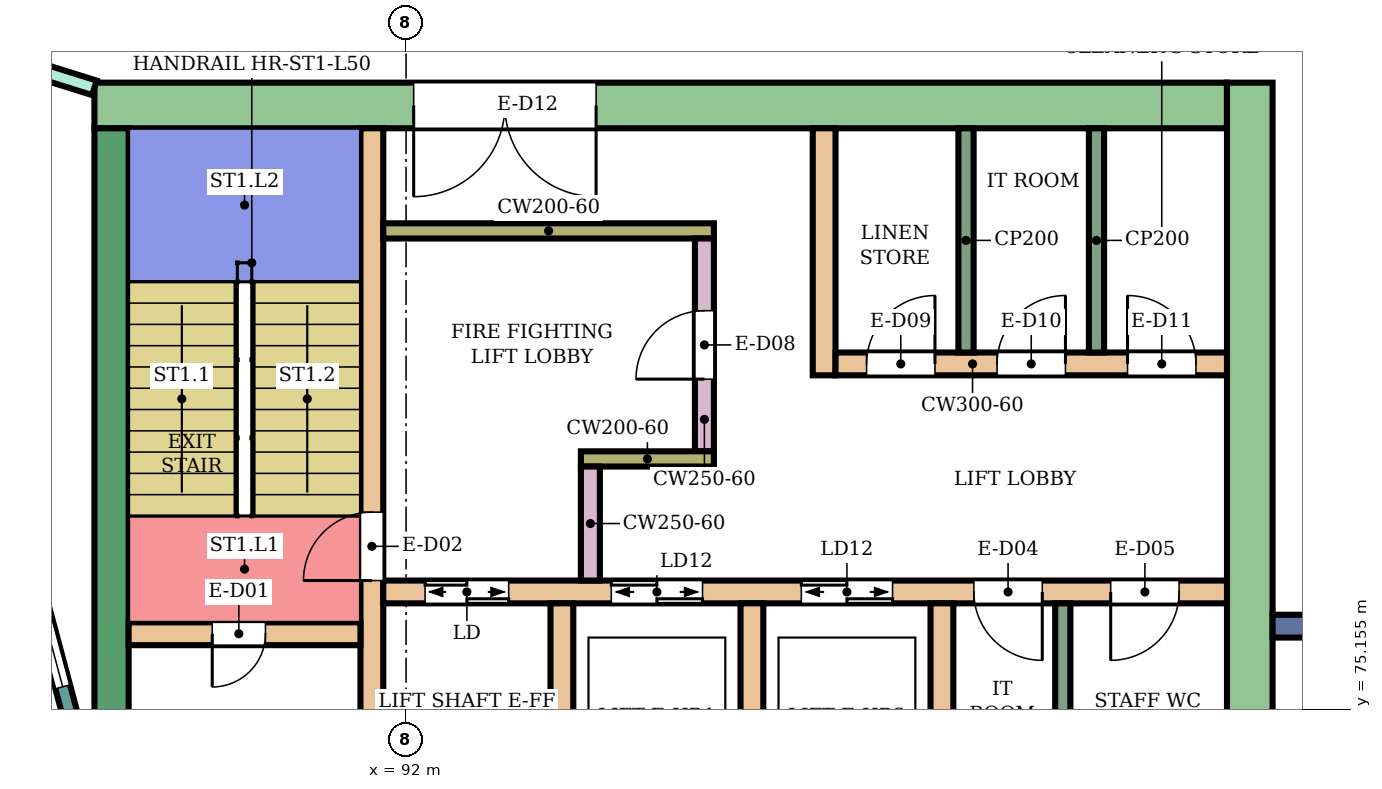
"""IFC4 building model, lengths in metres.
Left out: names, types, materials, properties, quantities, classifications, styles, units other than length and angle.
Written with IfcOpenShell. Run it as: python <this file> out.ifc"""

import sys

from ifc_helpers import new_model, si_unit, direction, frame, frame_2d, origin, place, context, subcontext, project, spatial, rectangle, extrude, element, fill, save


model = new_model("IFC4")
c1 = context("Model", 3, precision=1e-05, world=origin(), true_north=direction((0.0, 1.0)))
c2 = subcontext(c1, "Body", "Model", "MODEL_VIEW")
j1 = project(units=[si_unit("LENGTHUNIT", "METRE"), si_unit("PLANEANGLEUNIT", "RADIAN")], contexts=[c1])
p1 = place(None, origin())
s1 = spatial("IfcSite", under=j1, at=p1, CompositionType="ELEMENT")
p2 = place(p1, origin())
s2 = spatial("IfcBuilding", under=s1, at=p2, CompositionType="ELEMENT")
p3 = place(p2, frame((0.0, 0.0, 216.7)))
s3 = spatial("IfcBuildingStorey", under=s2, at=p3, CompositionType="ELEMENT", Elevation=216.7)
p4 = place(p3, frame((87.9, 83.1, 0.0), z_axis=(0.0, 0.0, 1.0), x_axis=(1.0, 0.0, 0.0)))
e1 = element("IfcWall", 1, at=p4, inside=s3, PredefinedType="SHEAR", context=c2, shape_type="SweptSolid", body=[
    extrude(rectangle(XDim=14.9, YDim=0.6, at=frame_2d((7.45, 0.0))), origin(), (0.0, 0.0, 1.0), 3.88),
])
p5 = place(p4, frame((4.2, 0.0, 0.0)))
e2 = element("IfcOpeningElement", 2, at=p5, cuts=e1, PredefinedType="OPENING", context=c2, shape_type="SweptSolid", body=[
    extrude(rectangle(XDim=2.4, YDim=2.4, at=frame_2d((1.2, 1.2))), frame((0.0, 0.31, 0.0), z_axis=(0.0, -1.0, 0.0), x_axis=(1.0, 0.0, 0.0)), (0.0, 0.0, 1.0), 0.62),
])
p6 = place(p3, frame((88.125, 75.0, 0.0), z_axis=(0.0, 0.0, 1.0), x_axis=(0.0, 1.0, 0.0)))
e3 = element("IfcWall", 3, at=p6, inside=s3, PredefinedType="SHEAR", context=c2, shape_type="SweptSolid", body=[
    extrude(rectangle(XDim=7.8, YDim=0.45, at=frame_2d((3.9, 0.0))), origin(), (0.0, 0.0, 1.0), 3.88),
])
p7 = place(p3, frame((103.1, 66.6, 0.0), z_axis=(0.0, 0.0, 1.0), x_axis=(0.0, 1.0, 0.0)))
e4 = element("IfcWall", 4, at=p7, inside=s3, PredefinedType="SHEAR", context=c2, shape_type="SweptSolid", body=[
    extrude(rectangle(XDim=16.8, YDim=0.6, at=frame_2d((8.4, 0.0))), origin(), (0.0, 0.0, 1.0), 3.88),
])
p8 = place(p3, frame((91.55, 75.0, 0.0), z_axis=(0.0, 0.0, 1.0), x_axis=(0.0, 1.0, 0.0)))
e5 = element("IfcWall", 5, at=p8, inside=s3, PredefinedType="SHEAR", context=c2, shape_type="SweptSolid", body=[
    extrude(rectangle(XDim=7.8, YDim=0.3, at=frame_2d((3.9, 0.0))), origin(), (0.0, 0.0, 1.0), 3.88),
])
p9 = place(p8, frame((1.85, 0.0, 0.0)))
e6 = element("IfcOpeningElement", 6, at=p9, cuts=e5, PredefinedType="OPENING", context=c2, shape_type="SweptSolid", body=[
    extrude(rectangle(XDim=0.9, YDim=2.1, at=frame_2d((0.45, 1.05))), frame((0.0, 0.16, 0.0), z_axis=(0.0, -1.0, 0.0), x_axis=(1.0, 0.0, 0.0)), (0.0, 0.0, 1.0), 0.32),
])
p10 = place(p3, frame((88.35, 76.15, 0.0), z_axis=(0.0, 0.0, 1.0), x_axis=(1.0, 0.0, 0.0)))
e7 = element("IfcWall", 7, at=p10, inside=s3, PredefinedType="SHEAR", context=c2, shape_type="SweptSolid", body=[
    extrude(rectangle(XDim=3.05, YDim=0.3, at=frame_2d((1.525, 0.0))), origin(), (0.0, 0.0, 1.0), 3.88),
])
p11 = place(p10, frame((1.1, 0.0, 0.0)))
e8 = element("IfcOpeningElement", 8, at=p11, cuts=e7, PredefinedType="OPENING", context=c2, shape_type="SweptSolid", body=[
    extrude(rectangle(XDim=0.7, YDim=2.0, at=frame_2d((0.35, 1.0))), frame((0.0, 0.16, 0.0), z_axis=(0.0, -1.0, 0.0), x_axis=(1.0, 0.0, 0.0)), (0.0, 0.0, 1.0), 0.32),
])
p12 = place(p3, frame((91.7, 76.7, 0.0), z_axis=(0.0, 0.0, 1.0), x_axis=(1.0, 0.0, 0.0)))
e9 = element("IfcWall", 9, at=p12, inside=s3, PredefinedType="SHEAR", context=c2, shape_type="SweptSolid", body=[
    extrude(rectangle(XDim=11.1, YDim=0.3, at=frame_2d((5.55, 0.0))), origin(), (0.0, 0.0, 1.0), 3.88),
])
p13 = place(p12, frame((0.55, 0.0, 0.0)))
e10 = element("IfcOpeningElement", 10, at=p13, cuts=e9, PredefinedType="OPENING", context=c2, shape_type="SweptSolid", body=[
    extrude(rectangle(XDim=1.1, YDim=2.1, at=frame_2d((0.55, 1.05))), frame((0.0, 0.16, 0.0), z_axis=(0.0, -1.0, 0.0), x_axis=(1.0, 0.0, 0.0)), (0.0, 0.0, 1.0), 0.32),
])
p14 = place(p12, frame((3.0, 0.0, 0.0)))
e11 = element("IfcOpeningElement", 11, at=p14, cuts=e9, PredefinedType="OPENING", context=c2, shape_type="SweptSolid", body=[
    extrude(rectangle(XDim=1.2, YDim=2.1, at=frame_2d((0.6, 1.05))), frame((0.0, 0.16, 0.0), z_axis=(0.0, -1.0, 0.0), x_axis=(1.0, 0.0, 0.0)), (0.0, 0.0, 1.0), 0.32),
])
p15 = place(p12, frame((5.5, 0.0, 0.0)))
e12 = element("IfcOpeningElement", 12, at=p15, cuts=e9, PredefinedType="OPENING", context=c2, shape_type="SweptSolid", body=[
    extrude(rectangle(XDim=1.2, YDim=2.1, at=frame_2d((0.6, 1.05))), frame((0.0, 0.16, 0.0), z_axis=(0.0, -1.0, 0.0), x_axis=(1.0, 0.0, 0.0)), (0.0, 0.0, 1.0), 0.32),
])
p16 = place(p12, frame((7.77, 0.0, 0.0)))
e13 = element("IfcOpeningElement", 13, at=p16, cuts=e9, PredefinedType="OPENING", context=c2, shape_type="SweptSolid", body=[
    extrude(rectangle(XDim=0.9, YDim=2.1, at=frame_2d((0.45, 1.05))), frame((0.0, 0.16, 0.0), z_axis=(0.0, -1.0, 0.0), x_axis=(1.0, 0.0, 0.0)), (0.0, 0.0, 1.0), 0.32),
])
p17 = place(p12, frame((9.57, 0.0, 0.0)))
e14 = element("IfcOpeningElement", 14, at=p17, cuts=e9, PredefinedType="OPENING", context=c2, shape_type="SweptSolid", body=[
    extrude(rectangle(XDim=0.9, YDim=2.1, at=frame_2d((0.45, 1.05))), frame((0.0, 0.16, 0.0), z_axis=(0.0, -1.0, 0.0), x_axis=(1.0, 0.0, 0.0)), (0.0, 0.0, 1.0), 0.32),
])
for number, where, z_axis, x_axis in (
    (15, (94.05, 74.0, 0.0), (0.0, 0.0, 1.0), (0.0, 1.0, 0.0)),
    (16, (96.55, 74.0, 0.0), (0.0, 0.0, 1.0), (0.0, 1.0, 0.0)),
    (17, (99.05, 74.0, 0.0), (0.0, 0.0, 1.0), (0.0, 1.0, 0.0)),
):
    element("IfcWall", number, at=place(p3, frame(where, z_axis=z_axis, x_axis=x_axis)), inside=s3, PredefinedType="SHEAR", context=c2, shape_type="SweptSolid", body=[
        extrude(rectangle(XDim=2.55, YDim=0.3, at=frame_2d((1.275, 0.0))), origin(), (0.0, 0.0, 1.0), 3.88),
    ])
p18 = place(p3, frame((91.7, 81.45, 0.0), z_axis=(0.0, 0.0, 1.0), x_axis=(1.0, 0.0, 0.0)))
e18 = element("IfcWall", 18, at=p18, inside=s3, PredefinedType="SHEAR", context=c2, shape_type="SweptSolid", body=[
    extrude(rectangle(XDim=4.35, YDim=0.2, at=frame_2d((2.175, 0.0))), origin(), (0.0, 0.0, 1.0), 3.88),
])
p19 = place(p3, frame((95.925, 78.55, 0.0), z_axis=(0.0, 0.0, 1.0), x_axis=(0.0, 1.0, 0.0)))
e19 = element("IfcWall", 19, at=p19, inside=s3, PredefinedType="SHEAR", context=c2, shape_type="SweptSolid", body=[
    extrude(rectangle(XDim=2.8, YDim=0.25, at=frame_2d((1.4, 0.0))), origin(), (0.0, 0.0, 1.0), 3.88),
])
p20 = place(p19, frame((0.95, 0.0, 0.0)))
e20 = element("IfcOpeningElement", 20, at=p20, cuts=e19, PredefinedType="OPENING", context=c2, shape_type="SweptSolid", body=[
    extrude(rectangle(XDim=0.9, YDim=2.1, at=frame_2d((0.45, 1.05))), frame((0.0, 0.135, 0.0), z_axis=(0.0, -1.0, 0.0), x_axis=(1.0, 0.0, 0.0)), (0.0, 0.0, 1.0), 0.27),
])
p21 = place(p3, frame((94.3, 78.45, 0.0), z_axis=(0.0, 0.0, 1.0), x_axis=(1.0, 0.0, 0.0)))
e21 = element("IfcWall", 21, at=p21, inside=s3, PredefinedType="SHEAR", context=c2, shape_type="SweptSolid", body=[
    extrude(rectangle(XDim=1.75, YDim=0.2, at=frame_2d((0.875, 0.0))), origin(), (0.0, 0.0, 1.0), 3.88),
])
p22 = place(p3, frame((94.425, 76.85, 0.0), z_axis=(0.0, 0.0, 1.0), x_axis=(0.0, 1.0, 0.0)))
e22 = element("IfcWall", 22, at=p22, inside=s3, PredefinedType="SHEAR", context=c2, shape_type="SweptSolid", body=[
    extrude(rectangle(XDim=1.5, YDim=0.25, at=frame_2d((0.75, 0.0))), origin(), (0.0, 0.0, 1.0), 3.88),
])
p23 = place(p3, frame((97.5, 79.55, 0.0), z_axis=(0.0, 0.0, 1.0), x_axis=(0.0, 1.0, 0.0)))
e23 = element("IfcWall", 23, at=p23, inside=s3, PredefinedType="SHEAR", context=c2, shape_type="SweptSolid", body=[
    extrude(rectangle(XDim=3.25, YDim=0.3, at=frame_2d((1.625, 0.0))), origin(), (0.0, 0.0, 1.0), 3.88),
])
p24 = place(p3, frame((97.65, 79.7, 0.0), z_axis=(0.0, 0.0, 1.0), x_axis=(1.0, 0.0, 0.0)))
e24 = element("IfcWall", 24, at=p24, inside=s3, PredefinedType="SHEAR", context=c2, shape_type="SweptSolid", body=[
    extrude(rectangle(XDim=5.15, YDim=0.3, at=frame_2d((2.575, 0.0))), origin(), (0.0, 0.0, 1.0), 3.88),
])
p25 = place(p24, frame((0.408, 0.0, 0.0)))
e25 = element("IfcOpeningElement", 25, at=p25, cuts=e24, PredefinedType="OPENING", context=c2, shape_type="SweptSolid", body=[
    extrude(rectangle(XDim=0.9, YDim=2.1, at=frame_2d((0.45, 1.05))), frame((0.0, 0.16, 0.0), z_axis=(0.0, -1.0, 0.0), x_axis=(1.0, 0.0, 0.0)), (0.0, 0.0, 1.0), 0.32),
])
p26 = place(p24, frame((2.125, 0.0, 0.0)))
e26 = element("IfcOpeningElement", 26, at=p26, cuts=e24, PredefinedType="OPENING", context=c2, shape_type="SweptSolid", body=[
    extrude(rectangle(XDim=0.9, YDim=2.1, at=frame_2d((0.45, 1.05))), frame((0.0, 0.16, 0.0), z_axis=(0.0, -1.0, 0.0), x_axis=(1.0, 0.0, 0.0)), (0.0, 0.0, 1.0), 0.32),
])
p27 = place(p24, frame((3.842, 0.0, 0.0)))
e27 = element("IfcOpeningElement", 27, at=p27, cuts=e24, PredefinedType="OPENING", context=c2, shape_type="SweptSolid", body=[
    extrude(rectangle(XDim=0.9, YDim=2.1, at=frame_2d((0.45, 1.05))), frame((0.0, 0.16, 0.0), z_axis=(0.0, -1.0, 0.0), x_axis=(1.0, 0.0, 0.0)), (0.0, 0.0, 1.0), 0.32),
])
p28 = place(p3, frame((103.4, 76.25, 0.0), z_axis=(0.0, 0.0, 1.0), x_axis=(1.0, 0.0, 0.0)))
e28 = element("IfcWall", 28, at=p28, inside=s3, PredefinedType="NOTDEFINED", context=c2, shape_type="SweptSolid", body=[
    extrude(rectangle(XDim=2.416, YDim=0.3, at=frame_2d((1.208, 0.0))), origin(), (0.0, 0.0, 1.0), 4.2),
])
p29 = place(p3, frame((87.604, 75.0, 0.0), z_axis=(0.0, 0.0, 1.0), x_axis=(-0.258789828301, 0.965933654434, 0.0)))
e29 = element("IfcWall", 29, at=p29, inside=s3, PredefinedType="NOTDEFINED", context=c2, shape_type="SweptSolid", body=[
    extrude(rectangle(XDim=3.936, YDim=0.2, at=frame_2d((1.968, 0.0))), origin(), (0.0, 0.0, 1.0), 4.2),
])
p30 = place(p29, frame((0.468, 0.0, 0.9)))
e30 = element("IfcOpeningElement", 30, at=p30, cuts=e29, PredefinedType="OPENING", context=c2, shape_type="SweptSolid", body=[
    extrude(rectangle(XDim=3.0, YDim=2.3, at=frame_2d((1.5, 1.15))), frame((0.0, 0.11, 0.0), z_axis=(0.0, -1.0, 0.0), x_axis=(1.0, 0.0, 0.0)), (0.0, 0.0, 1.0), 0.22),
])
p31 = place(p3, frame((85.587, 84.057, 0.0), z_axis=(0.0, 0.0, 1.0), x_axis=(0.954239513179, -0.299043393987, 0.0)))
e31 = element("IfcWall", 31, at=p31, inside=s3, PredefinedType="PARTITIONING", context=c2, shape_type="SweptSolid", body=[
    extrude(rectangle(XDim=2.424, YDim=0.2, at=frame_2d((1.212, 0.0))), origin(), (0.0, 0.0, 1.0), 3.75),
])
p32 = place(p31, frame((0.762, 0.0, 0.0)))
e32 = element("IfcOpeningElement", 32, at=p32, cuts=e31, PredefinedType="OPENING", context=c2, shape_type="SweptSolid", body=[
    extrude(rectangle(XDim=0.9, YDim=2.1, at=frame_2d((0.45, 1.05))), frame((0.0, 0.11, 0.0), z_axis=(0.0, -1.0, 0.0), x_axis=(1.0, 0.0, 0.0)), (0.0, 0.0, 1.0), 0.22),
])
p33 = place(p3, frame((100.64, 74.0, 0.0), z_axis=(0.0, 0.0, 1.0), x_axis=(0.0, 1.0, 0.0)))
e33 = element("IfcWall", 33, at=p33, inside=s3, PredefinedType="PARTITIONING", context=c2, shape_type="SweptSolid", body=[
    extrude(rectangle(XDim=2.55, YDim=0.2, at=frame_2d((1.275, 0.0))), origin(), (0.0, 0.0, 1.0), 3.88),
])
for number, where, z_axis, x_axis in (
    (34, (99.367, 79.85, 0.0), (0.0, 0.0, 1.0), (0.0, 1.0, 0.0)),
    (35, (101.083, 79.85, 0.0), (0.0, 0.0, 1.0), (0.0, 1.0, 0.0)),
):
    element("IfcWall", number, at=place(p3, frame(where, z_axis=z_axis, x_axis=x_axis)), inside=s3, PredefinedType="PARTITIONING", context=c2, shape_type="SweptSolid", body=[
        extrude(rectangle(XDim=2.95, YDim=0.2, at=frame_2d((1.475, 0.0))), origin(), (0.0, 0.0, 1.0), 3.88),
    ])
p34 = place(p30, origin())
e36 = element("IfcWindow", 36, at=p34, inside=s3, PartitioningType="SINGLE_PANEL", PredefinedType="WINDOW", context=c2, shape_type="SweptSolid", body=[
    extrude(rectangle(XDim=3.0, YDim=2.3, at=frame_2d((1.5, 1.15))), frame((0.0, 0.03, 0.0), z_axis=(0.0, -1.0, 0.0), x_axis=(1.0, 0.0, 0.0)), (0.0, 0.0, 1.0), 0.06),
])
fill(e30, e36)
p35 = place(p11, frame((0.7, 0.0, 0.0), z_axis=(0.0, 0.0, 1.0), x_axis=(-1.0, 0.0, 0.0)))
e37 = element("IfcDoor", 37, at=p35, inside=s3, OperationType="SINGLE_SWING_RIGHT", PredefinedType="DOOR", context=c2, shape_type="SweptSolid", body=[
    extrude(rectangle(XDim=0.7, YDim=2.0, at=frame_2d((0.35, 1.0))), frame((0.0, 0.025, 0.0), z_axis=(0.0, -1.0, 0.0), x_axis=(1.0, 0.0, 0.0)), (0.0, 0.0, 1.0), 0.05),
])
fill(e8, e37)
p36 = place(p9, origin())
e38 = element("IfcDoor", 38, at=p36, inside=s3, OperationType="SINGLE_SWING_LEFT", PredefinedType="DOOR", context=c2, shape_type="SweptSolid", body=[
    extrude(rectangle(XDim=0.9, YDim=2.1, at=frame_2d((0.45, 1.05))), frame((0.0, 0.025, 0.0), z_axis=(0.0, -1.0, 0.0), x_axis=(1.0, 0.0, 0.0)), (0.0, 0.0, 1.0), 0.05),
])
fill(e6, e38)
p37 = place(p13, origin())
e39 = element("IfcDoor", 39, at=p37, inside=s3, OperationType="DOUBLE_DOOR_SLIDING", PredefinedType="DOOR", context=c2, shape_type="SweptSolid", body=[
    extrude(rectangle(XDim=1.1, YDim=2.1, at=frame_2d((0.55, 1.05))), frame((0.0, 0.025, 0.0), z_axis=(0.0, -1.0, 0.0), x_axis=(1.0, 0.0, 0.0)), (0.0, 0.0, 1.0), 0.05),
])
fill(e10, e39)
p38 = place(p14, origin())
e40 = element("IfcDoor", 40, at=p38, inside=s3, OperationType="DOUBLE_DOOR_SLIDING", PredefinedType="DOOR", context=c2, shape_type="SweptSolid", body=[
    extrude(rectangle(XDim=1.2, YDim=2.1, at=frame_2d((0.6, 1.05))), frame((0.0, 0.025, 0.0), z_axis=(0.0, -1.0, 0.0), x_axis=(1.0, 0.0, 0.0)), (0.0, 0.0, 1.0), 0.05),
])
fill(e11, e40)
p39 = place(p15, origin())
e41 = element("IfcDoor", 41, at=p39, inside=s3, OperationType="DOUBLE_DOOR_SLIDING", PredefinedType="DOOR", context=c2, shape_type="SweptSolid", body=[
    extrude(rectangle(XDim=1.2, YDim=2.1, at=frame_2d((0.6, 1.05))), frame((0.0, 0.025, 0.0), z_axis=(0.0, -1.0, 0.0), x_axis=(1.0, 0.0, 0.0)), (0.0, 0.0, 1.0), 0.05),
])
fill(e12, e41)
p40 = place(p16, frame((0.9, 0.0, 0.0), z_axis=(0.0, 0.0, 1.0), x_axis=(-1.0, 0.0, 0.0)))
e42 = element("IfcDoor", 42, at=p40, inside=s3, OperationType="SINGLE_SWING_LEFT", PredefinedType="DOOR", context=c2, shape_type="SweptSolid", body=[
    extrude(rectangle(XDim=0.9, YDim=2.1, at=frame_2d((0.45, 1.05))), frame((0.0, 0.025, 0.0), z_axis=(0.0, -1.0, 0.0), x_axis=(1.0, 0.0, 0.0)), (0.0, 0.0, 1.0), 0.05),
])
fill(e13, e42)
p41 = place(p17, frame((0.9, 0.0, 0.0), z_axis=(0.0, 0.0, 1.0), x_axis=(-1.0, 0.0, 0.0)))
e43 = element("IfcDoor", 43, at=p41, inside=s3, OperationType="SINGLE_SWING_RIGHT", PredefinedType="DOOR", context=c2, shape_type="SweptSolid", body=[
    extrude(rectangle(XDim=0.9, YDim=2.1, at=frame_2d((0.45, 1.05))), frame((0.0, 0.025, 0.0), z_axis=(0.0, -1.0, 0.0), x_axis=(1.0, 0.0, 0.0)), (0.0, 0.0, 1.0), 0.05),
])
fill(e14, e43)
p42 = place(p20, origin())
e44 = element("IfcDoor", 44, at=p42, inside=s3, OperationType="SINGLE_SWING_LEFT", PredefinedType="DOOR", context=c2, shape_type="SweptSolid", body=[
    extrude(rectangle(XDim=0.9, YDim=2.1, at=frame_2d((0.45, 1.05))), frame((0.0, 0.025, 0.0), z_axis=(0.0, -1.0, 0.0), x_axis=(1.0, 0.0, 0.0)), (0.0, 0.0, 1.0), 0.05),
])
fill(e20, e44)
p43 = place(p25, origin())
e45 = element("IfcDoor", 45, at=p43, inside=s3, OperationType="SINGLE_SWING_RIGHT", PredefinedType="DOOR", context=c2, shape_type="SweptSolid", body=[
    extrude(rectangle(XDim=0.9, YDim=2.1, at=frame_2d((0.45, 1.05))), frame((0.0, 0.025, 0.0), z_axis=(0.0, -1.0, 0.0), x_axis=(1.0, 0.0, 0.0)), (0.0, 0.0, 1.0), 0.05),
])
fill(e25, e45)
p44 = place(p26, origin())
e46 = element("IfcDoor", 46, at=p44, inside=s3, OperationType="SINGLE_SWING_RIGHT", PredefinedType="DOOR", context=c2, shape_type="SweptSolid", body=[
    extrude(rectangle(XDim=0.9, YDim=2.1, at=frame_2d((0.45, 1.05))), frame((0.0, 0.025, 0.0), z_axis=(0.0, -1.0, 0.0), x_axis=(1.0, 0.0, 0.0)), (0.0, 0.0, 1.0), 0.05),
])
fill(e26, e46)
p45 = place(p27, origin())
e47 = element("IfcDoor", 47, at=p45, inside=s3, OperationType="SINGLE_SWING_LEFT", PredefinedType="DOOR", context=c2, shape_type="SweptSolid", body=[
    extrude(rectangle(XDim=0.9, YDim=2.1, at=frame_2d((0.45, 1.05))), frame((0.0, 0.025, 0.0), z_axis=(0.0, -1.0, 0.0), x_axis=(1.0, 0.0, 0.0)), (0.0, 0.0, 1.0), 0.05),
])
fill(e27, e47)
p46 = place(p5, frame((2.4, 0.0, 0.0), z_axis=(0.0, 0.0, 1.0), x_axis=(-1.0, 0.0, 0.0)))
e48 = element("IfcDoor", 48, at=p46, inside=s3, OperationType="DOUBLE_DOOR_SINGLE_SWING", PredefinedType="DOOR", context=c2, shape_type="SweptSolid", body=[
    extrude(rectangle(XDim=2.4, YDim=2.4, at=frame_2d((1.2, 1.2))), frame((0.0, 0.025, 0.0), z_axis=(0.0, -1.0, 0.0), x_axis=(1.0, 0.0, 0.0)), (0.0, 0.0, 1.0), 0.05),
])
fill(e2, e48)
save(model, sys.argv[1])
